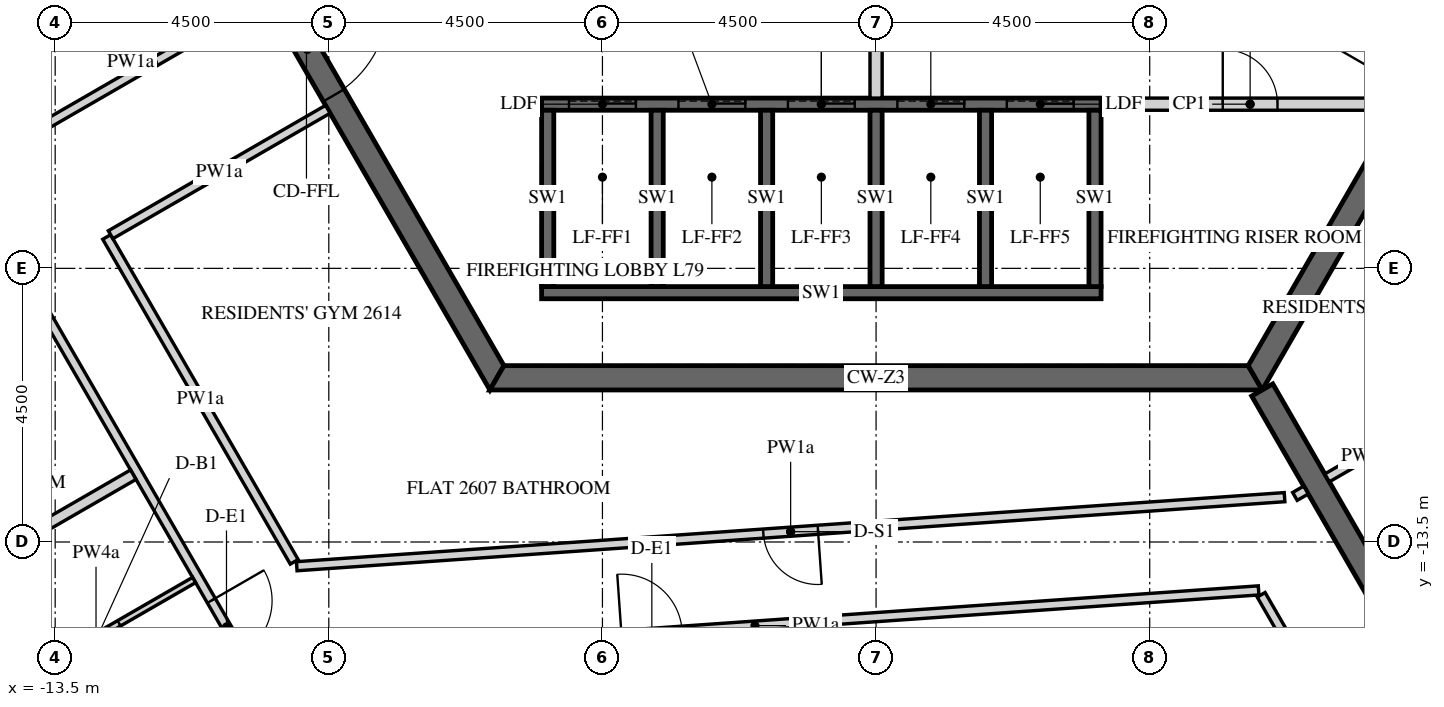
"""IFC4 building model, lengths in metres.
Left out: names, types, materials, properties, quantities, classifications, styles, units other than length and angle.
Written with IfcOpenShell. Run it as: python <this file> out.ifc"""

import sys

from ifc_helpers import new_model, si_unit, direction, frame, frame_2d, origin, place, context, subcontext, project, spatial, polyline, rectangle, outline, extrude, element, fill, save


model = new_model("IFC4")
c1 = context("Model", 3, precision=1e-05, world=origin(), true_north=direction((0.0, 1.0)))
c2 = subcontext(c1, "Body", "Model", "MODEL_VIEW")
j1 = project(units=[si_unit("LENGTHUNIT", "METRE"), si_unit("PLANEANGLEUNIT", "RADIAN")], contexts=[c1])
p1 = place(None, origin())
s1 = spatial("IfcSite", under=j1, at=p1, CompositionType="ELEMENT")
p2 = place(p1, origin())
s2 = spatial("IfcBuilding", under=s1, at=p2, CompositionType="ELEMENT")
p3 = place(p2, frame((0.0, 0.0, 326.4)))
s3 = spatial("IfcBuildingStorey", under=s2, at=p3, CompositionType="ELEMENT", Elevation=326.4)
p4 = place(p3, frame((-12.471, 0.0, -0.15), z_axis=(0.0, 0.0, 1.0), x_axis=(0.499996419489, -0.866027470984, 0.0)))
e1 = element("IfcWall", 1, at=p4, inside=s3, PredefinedType="SHEAR", context=c2, shape_type="SweptSolid", body=[
    extrude(outline(polyline([(-0.115, -0.2), (12.586, -0.2), (12.355, 0.2), (0.115, 0.2), (-0.115, -0.2)])), origin(), (0.0, 0.0, 1.0), 3.9),
])
p5 = place(p4, frame((5.306, 0.0, 0.15)))
e2 = element("IfcOpeningElement", 2, at=p5, cuts=e1, PredefinedType="OPENING", context=c2, shape_type="SweptSolid", body=[
    extrude(rectangle(XDim=1.8, YDim=2.4, at=frame_2d((0.9, 1.2))), frame((0.0, 0.21, 0.0), z_axis=(0.0, -1.0, 0.0), x_axis=(1.0, 0.0, 0.0)), (0.0, 0.0, 1.0), 0.42),
])
p6 = place(p3, frame((-6.235, -10.8, -0.15), z_axis=(0.0, 0.0, 1.0), x_axis=(1.0, 0.0, 0.0)))
e3 = element("IfcWall", 3, at=p6, inside=s3, PredefinedType="SHEAR", context=c2, shape_type="SweptSolid", body=[
    extrude(outline(polyline([(-0.115, -0.2), (12.586, -0.2), (12.355, 0.2), (0.115, 0.2), (-0.115, -0.2)])), origin(), (0.0, 0.0, 1.0), 3.9),
])
p7 = place(p3, frame((6.235, -10.8, -0.15), z_axis=(0.0, 0.0, 1.0), x_axis=(0.499996419489, 0.866027470984, 0.0)))
e4 = element("IfcWall", 4, at=p7, inside=s3, PredefinedType="SHEAR", context=c2, shape_type="SweptSolid", body=[
    extrude(outline(polyline([(-0.115, -0.2), (12.586, -0.2), (12.355, 0.2), (0.115, 0.2), (-0.115, -0.2)])), origin(), (0.0, 0.0, 1.0), 3.9),
])
p8 = place(p7, frame((5.364, 0.0, 0.15)))
e5 = element("IfcOpeningElement", 5, at=p8, cuts=e4, PredefinedType="OPENING", context=c2, shape_type="SweptSolid", body=[
    extrude(rectangle(XDim=1.8, YDim=2.4, at=frame_2d((0.9, 1.2))), frame((0.0, 0.21, 0.0), z_axis=(0.0, -1.0, 0.0), x_axis=(1.0, 0.0, 0.0)), (0.0, 0.0, 1.0), 0.42),
])
p9 = place(p3, frame((6.351, -11.0, -0.15), z_axis=(0.0, 0.0, 1.0), x_axis=(0.499998894578, -0.866026041999, 0.0)))
e6 = element("IfcWall", 6, at=p9, inside=s3, PredefinedType="SHEAR", context=c2, shape_type="SweptSolid", body=[
    extrude(rectangle(XDim=15.544, YDim=0.4, at=frame_2d((7.772, 0.0))), origin(), (0.0, 0.0, 1.0), 3.9),
])
p10 = place(p9, frame((6.872, 0.0, 0.15)))
e7 = element("IfcOpeningElement", 7, at=p10, cuts=e6, PredefinedType="OPENING", context=c2, shape_type="SweptSolid", body=[
    extrude(rectangle(XDim=1.8, YDim=2.4, at=frame_2d((0.9, 1.2))), frame((0.0, 0.21, 0.0), z_axis=(0.0, -1.0, 0.0), x_axis=(1.0, 0.0, 0.0)), (0.0, 0.0, 1.0), 0.42),
])
p11 = place(p3, frame((-5.5, -6.3, -0.25), z_axis=(0.0, 0.0, 1.0), x_axis=(1.0, 0.0, 0.0)))
e8 = element("IfcWall", 8, at=p11, inside=s3, PredefinedType="SHEAR", context=c2, shape_type="SweptSolid", body=[
    extrude(rectangle(XDim=9.2, YDim=0.2, at=frame_2d((4.6, 0.0))), origin(), (0.0, 0.0, 1.0), 3.9),
])
p12 = place(p11, frame((0.45, 0.0, 0.25)))
e9 = element("IfcOpeningElement", 9, at=p12, cuts=e8, PredefinedType="OPENING", context=c2, shape_type="SweptSolid", body=[
    extrude(rectangle(XDim=1.1, YDim=2.1, at=frame_2d((0.55, 1.05))), frame((0.0, 0.11, 0.0), z_axis=(0.0, -1.0, 0.0), x_axis=(1.0, 0.0, 0.0)), (0.0, 0.0, 1.0), 0.22),
])
p13 = place(p11, frame((2.25, 0.0, 0.25)))
e10 = element("IfcOpeningElement", 10, at=p13, cuts=e8, PredefinedType="OPENING", context=c2, shape_type="SweptSolid", body=[
    extrude(rectangle(XDim=1.1, YDim=2.1, at=frame_2d((0.55, 1.05))), frame((0.0, 0.11, 0.0), z_axis=(0.0, -1.0, 0.0), x_axis=(1.0, 0.0, 0.0)), (0.0, 0.0, 1.0), 0.22),
])
p14 = place(p11, frame((4.05, 0.0, 0.25)))
e11 = element("IfcOpeningElement", 11, at=p14, cuts=e8, PredefinedType="OPENING", context=c2, shape_type="SweptSolid", body=[
    extrude(rectangle(XDim=1.1, YDim=2.1, at=frame_2d((0.55, 1.05))), frame((0.0, 0.11, 0.0), z_axis=(0.0, -1.0, 0.0), x_axis=(1.0, 0.0, 0.0)), (0.0, 0.0, 1.0), 0.22),
])
p15 = place(p11, frame((5.85, 0.0, 0.25)))
e12 = element("IfcOpeningElement", 12, at=p15, cuts=e8, PredefinedType="OPENING", context=c2, shape_type="SweptSolid", body=[
    extrude(rectangle(XDim=1.1, YDim=2.1, at=frame_2d((0.55, 1.05))), frame((0.0, 0.11, 0.0), z_axis=(0.0, -1.0, 0.0), x_axis=(1.0, 0.0, 0.0)), (0.0, 0.0, 1.0), 0.22),
])
p16 = place(p11, frame((7.65, 0.0, 0.25)))
e13 = element("IfcOpeningElement", 13, at=p16, cuts=e8, PredefinedType="OPENING", context=c2, shape_type="SweptSolid", body=[
    extrude(rectangle(XDim=1.1, YDim=2.1, at=frame_2d((0.55, 1.05))), frame((0.0, 0.11, 0.0), z_axis=(0.0, -1.0, 0.0), x_axis=(1.0, 0.0, 0.0)), (0.0, 0.0, 1.0), 0.22),
])
p17 = place(p3, frame((-5.5, -9.4, -0.25), z_axis=(0.0, 0.0, 1.0), x_axis=(1.0, 0.0, 0.0)))
e14 = element("IfcWall", 14, at=p17, inside=s3, PredefinedType="SHEAR", context=c2, shape_type="SweptSolid", body=[
    extrude(rectangle(XDim=9.2, YDim=0.2, at=frame_2d((4.6, 0.0))), origin(), (0.0, 0.0, 1.0), 3.9),
])
for number, where, z_axis, x_axis in (
    (15, (-5.4, -9.3, -0.25), (0.0, 0.0, 1.0), (0.0, 1.0, 0.0)),
    (16, (-3.6, -9.3, -0.25), (0.0, 0.0, 1.0), (0.0, 1.0, 0.0)),
    (17, (-1.8, -9.3, -0.25), (0.0, 0.0, 1.0), (0.0, 1.0, 0.0)),
    (18, (0.0, -9.3, -0.25), (0.0, 0.0, 1.0), (0.0, 1.0, 0.0)),
    (19, (1.8, -9.3, -0.25), (0.0, 0.0, 1.0), (0.0, 1.0, 0.0)),
    (20, (3.6, -9.3, -0.25), (0.0, 0.0, 1.0), (0.0, 1.0, 0.0)),
):
    element("IfcWall", number, at=place(p3, frame(where, z_axis=z_axis, x_axis=x_axis)), inside=s3, PredefinedType="SHEAR", context=c2, shape_type="SweptSolid", body=[
        extrude(rectangle(XDim=2.9, YDim=0.2, at=frame_2d((1.45, 0.0))), origin(), (0.0, 0.0, 1.0), 3.9),
    ])
p18 = place(p3, frame((0.0, -6.2, 0.0), z_axis=(0.0, 0.0, 1.0), x_axis=(0.0, 1.0, 0.0)))
e21 = element("IfcWall", 21, at=p18, inside=s3, PredefinedType="PARTITIONING", context=c2, shape_type="SweptSolid", body=[
    extrude(rectangle(XDim=6.1, YDim=0.2, at=frame_2d((3.05, 0.0))), origin(), (0.0, 0.0, 1.0), 3.65),
])
p19 = place(p3, frame((3.7, -6.3, 0.0), z_axis=(0.0, 0.0, 1.0), x_axis=(1.0, 0.0, 0.0)))
e22 = element("IfcWall", 22, at=p19, inside=s3, PredefinedType="PARTITIONING", context=c2, shape_type="SweptSolid", body=[
    extrude(rectangle(XDim=4.903, YDim=0.2, at=frame_2d((2.451, 0.0))), origin(), (0.0, 0.0, 1.0), 3.65),
])
p20 = place(p19, frame((2.001, 0.0, 0.0)))
e23 = element("IfcOpeningElement", 23, at=p20, cuts=e22, PredefinedType="OPENING", context=c2, shape_type="SweptSolid", body=[
    extrude(rectangle(XDim=0.9, YDim=2.1, at=frame_2d((0.45, 1.05))), frame((0.0, 0.11, 0.0), z_axis=(0.0, -1.0, 0.0), x_axis=(1.0, 0.0, 0.0)), (0.0, 0.0, 1.0), 0.22),
])
p21 = place(p3, frame((-17.696, -2.749, 0.0), z_axis=(0.0, 0.0, 1.0), x_axis=(0.499997948852, -0.866026588012, 0.0)))
e24 = element("IfcWall", 24, at=p21, inside=s3, PredefinedType="PARTITIONING", context=c2, shape_type="SweptSolid", body=[
    extrude(rectangle(XDim=14.677, YDim=0.15, at=frame_2d((7.339, 0.0))), origin(), (0.0, 0.0, 1.0), 2.838),
])
p22 = place(p21, frame((0.4, 0.0, 0.0)))
e25 = element("IfcOpeningElement", 25, at=p22, cuts=e24, PredefinedType="OPENING", context=c2, shape_type="SweptSolid", body=[
    extrude(rectangle(XDim=1.0, YDim=2.1, at=frame_2d((0.5, 1.05))), frame((0.0, 0.085, 0.0), z_axis=(0.0, -1.0, 0.0), x_axis=(1.0, 0.0, 0.0)), (0.0, 0.0, 1.0), 0.17),
])
p23 = place(p21, frame((13.527, 0.0, 0.0)))
e26 = element("IfcOpeningElement", 26, at=p23, cuts=e24, PredefinedType="OPENING", context=c2, shape_type="SweptSolid", body=[
    extrude(rectangle(XDim=1.0, YDim=2.1, at=frame_2d((0.5, 1.05))), frame((0.0, 0.085, 0.0), z_axis=(0.0, -1.0, 0.0), x_axis=(1.0, 0.0, 0.0)), (0.0, 0.0, 1.0), 0.17),
])
p24 = place(p3, frame((-10.274, -15.454, 0.0), z_axis=(0.0, 0.0, 1.0), x_axis=(0.997563645223, 0.069762265797, 0.0)))
e27 = element("IfcWall", 27, at=p24, inside=s3, PredefinedType="PARTITIONING", context=c2, shape_type="SweptSolid", body=[
    extrude(rectangle(XDim=16.606, YDim=0.15, at=frame_2d((8.303, 0.0))), origin(), (0.0, 0.0, 1.0), 2.838),
])
p25 = place(p24, frame((6.103, 0.0, 0.0)))
e28 = element("IfcOpeningElement", 28, at=p25, cuts=e27, PredefinedType="OPENING", context=c2, shape_type="SweptSolid", body=[
    extrude(rectangle(XDim=1.0, YDim=2.1, at=frame_2d((0.5, 1.05))), frame((0.0, 0.085, 0.0), z_axis=(0.0, -1.0, 0.0), x_axis=(1.0, 0.0, 0.0)), (0.0, 0.0, 1.0), 0.17),
])
p26 = place(p3, frame((6.333, -14.368, 0.0), z_axis=(0.0, 0.0, 1.0), x_axis=(0.499977396983, -0.866038453249, 0.0)))
e29 = element("IfcWall", 29, at=p26, inside=s3, PredefinedType="PARTITIONING", context=c2, shape_type="SweptSolid", body=[
    extrude(rectangle(XDim=7.764, YDim=0.15, at=frame_2d((3.882, 0.0))), origin(), (0.0, 0.0, 1.0), 2.838),
])
p27 = place(p26, frame((4.364, 0.0, 0.0)))
e30 = element("IfcOpeningElement", 30, at=p27, cuts=e29, PredefinedType="OPENING", context=c2, shape_type="SweptSolid", body=[
    extrude(rectangle(XDim=1.0, YDim=2.1, at=frame_2d((0.5, 1.05))), frame((0.0, 0.085, 0.0), z_axis=(0.0, -1.0, 0.0), x_axis=(1.0, 0.0, 0.0)), (0.0, 0.0, 1.0), 0.17),
])
p28 = place(p3, frame((-10.066, -4.566, 0.0), z_axis=(0.0, 0.0, 1.0), x_axis=(-0.866023935413, -0.500002543286, 0.0)))
e31 = element("IfcWall", 31, at=p28, inside=s3, PredefinedType="PARTITIONING", context=c2, shape_type="SweptSolid", body=[
    extrude(rectangle(XDim=4.2, YDim=0.15, at=frame_2d((2.1, 0.0))), origin(), (0.0, 0.0, 1.0), 2.838),
])
p29 = place(p3, frame((7.07, -12.646, 0.0), z_axis=(0.0, 0.0, 1.0), x_axis=(-0.866378867349, -0.499387282788, 0.0)))
e32 = element("IfcWall", 32, at=p29, inside=s3, PredefinedType="PARTITIONING", context=c2, shape_type="SweptSolid", body=[
    extrude(rectangle(XDim=0.21, YDim=0.15, at=frame_2d((0.105, 0.0))), origin(), (0.0, 0.0, 1.0), 2.838),
])
p30 = place(p3, frame((6.717, -12.762, 0.0), z_axis=(0.0, 0.0, 1.0), x_axis=(-0.99756375843, -0.069760646978, 0.0)))
e33 = element("IfcWall", 33, at=p30, inside=s3, PredefinedType="PARTITIONING", context=c2, shape_type="SweptSolid", body=[
    extrude(rectangle(XDim=16.284, YDim=0.15, at=frame_2d((8.142, 0.0))), origin(), (0.0, 0.0, 1.0), 2.838),
])
p31 = place(p30, frame((7.692, 0.0, 0.0)))
e34 = element("IfcOpeningElement", 34, at=p31, cuts=e33, PredefinedType="OPENING", context=c2, shape_type="SweptSolid", body=[
    extrude(rectangle(XDim=0.9, YDim=2.1, at=frame_2d((0.45, 1.05))), frame((0.0, 0.085, 0.0), z_axis=(0.0, -1.0, 0.0), x_axis=(1.0, 0.0, 0.0)), (0.0, 0.0, 1.0), 0.17),
])
p32 = place(p3, frame((-9.569, -13.826, 0.0), z_axis=(0.0, 0.0, 1.0), x_axis=(-0.500017101833, 0.866015529811, 0.0)))
e35 = element("IfcWall", 35, at=p32, inside=s3, PredefinedType="PARTITIONING", context=c2, shape_type="SweptSolid", body=[
    extrude(rectangle(XDim=6.168, YDim=0.15, at=frame_2d((3.084, 0.0))), origin(), (0.0, 0.0, 1.0), 2.838),
])
p33 = place(p3, frame((-12.588, -8.447, 0.0), z_axis=(0.0, 0.0, 1.0), x_axis=(0.866034795751, 0.499983732284, 0.0)))
e36 = element("IfcWall", 36, at=p33, inside=s3, PredefinedType="PARTITIONING", context=c2, shape_type="SweptSolid", body=[
    extrude(rectangle(XDim=4.125, YDim=0.15, at=frame_2d((2.062, 0.0))), origin(), (0.0, 0.0, 1.0), 2.838),
])
p34 = place(p3, frame((8.65, -11.733, 0.0), z_axis=(0.0, 0.0, 1.0), x_axis=(-0.866062911188, -0.499935029643, 0.0)))
e37 = element("IfcWall", 37, at=p34, inside=s3, PredefinedType="PARTITIONING", context=c2, shape_type="SweptSolid", body=[
    extrude(rectangle(XDim=1.425, YDim=0.15, at=frame_2d((0.712, 0.0))), origin(), (0.0, 0.0, 1.0), 2.838),
])
p35 = place(p3, frame((-19.771, -16.755, 0.0), z_axis=(0.0, 0.0, 1.0), x_axis=(0.866025292695, 0.500000192413, 0.0)))
e38 = element("IfcWall", 38, at=p35, inside=s3, PredefinedType="PARTITIONING", context=c2, shape_type="SweptSolid", body=[
    extrude(rectangle(XDim=8.725, YDim=0.18, at=frame_2d((4.363, 0.0))), origin(), (0.0, 0.0, 1.0), 2.838),
])
p36 = place(p3, frame((-11.215, -14.125, 0.0), z_axis=(0.0, 0.0, 1.0), x_axis=(-0.866028424924, -0.499994767197, 0.0)))
e39 = element("IfcWall", 39, at=p36, inside=s3, PredefinedType="PARTITIONING", context=c2, shape_type="SweptSolid", body=[
    extrude(rectangle(XDim=3.725, YDim=0.1, at=frame_2d((1.863, 0.0))), origin(), (0.0, 0.0, 1.0), 2.838),
])
p37 = place(p36, frame((1.425, 0.0, 0.0)))
e40 = element("IfcOpeningElement", 40, at=p37, cuts=e39, PredefinedType="OPENING", context=c2, shape_type="SweptSolid", body=[
    extrude(rectangle(XDim=0.8, YDim=2.1, at=frame_2d((0.4, 1.05))), frame((0.0, 0.06, 0.0), z_axis=(0.0, -1.0, 0.0), x_axis=(1.0, 0.0, 0.0)), (0.0, 0.0, 1.0), 0.12),
])
p38 = place(p5, origin())
e41 = element("IfcDoor", 41, at=p38, inside=s3, OperationType="DOUBLE_DOOR_SINGLE_SWING", PredefinedType="DOOR", context=c2, shape_type="SweptSolid", body=[
    extrude(rectangle(XDim=1.8, YDim=2.4, at=frame_2d((0.9, 1.2))), frame((0.0, 0.025, 0.0), z_axis=(0.0, -1.0, 0.0), x_axis=(1.0, 0.0, 0.0)), (0.0, 0.0, 1.0), 0.05),
])
fill(e2, e41)
p39 = place(p20, origin())
e42 = element("IfcDoor", 42, at=p39, inside=s3, OperationType="SINGLE_SWING_LEFT", PredefinedType="DOOR", context=c2, shape_type="SweptSolid", body=[
    extrude(rectangle(XDim=0.9, YDim=2.1, at=frame_2d((0.45, 1.05))), frame((0.0, 0.025, 0.0), z_axis=(0.0, -1.0, 0.0), x_axis=(1.0, 0.0, 0.0)), (0.0, 0.0, 1.0), 0.05),
])
fill(e23, e42)
p40 = place(p12, origin())
e43 = element("IfcDoor", 43, at=p40, inside=s3, OperationType="SLIDING_TO_LEFT", PredefinedType="DOOR", context=c2, shape_type="SweptSolid", body=[
    extrude(rectangle(XDim=1.1, YDim=2.1, at=frame_2d((0.55, 1.05))), frame((0.0, 0.025, 0.0), z_axis=(0.0, -1.0, 0.0), x_axis=(1.0, 0.0, 0.0)), (0.0, 0.0, 1.0), 0.05),
])
fill(e9, e43)
p41 = place(p13, origin())
e44 = element("IfcDoor", 44, at=p41, inside=s3, OperationType="SLIDING_TO_LEFT", PredefinedType="DOOR", context=c2, shape_type="SweptSolid", body=[
    extrude(rectangle(XDim=1.1, YDim=2.1, at=frame_2d((0.55, 1.05))), frame((0.0, 0.025, 0.0), z_axis=(0.0, -1.0, 0.0), x_axis=(1.0, 0.0, 0.0)), (0.0, 0.0, 1.0), 0.05),
])
fill(e10, e44)
p42 = place(p14, origin())
e45 = element("IfcDoor", 45, at=p42, inside=s3, OperationType="SLIDING_TO_LEFT", PredefinedType="DOOR", context=c2, shape_type="SweptSolid", body=[
    extrude(rectangle(XDim=1.1, YDim=2.1, at=frame_2d((0.55, 1.05))), frame((0.0, 0.025, 0.0), z_axis=(0.0, -1.0, 0.0), x_axis=(1.0, 0.0, 0.0)), (0.0, 0.0, 1.0), 0.05),
])
fill(e11, e45)
p43 = place(p15, origin())
e46 = element("IfcDoor", 46, at=p43, inside=s3, OperationType="SLIDING_TO_LEFT", PredefinedType="DOOR", context=c2, shape_type="SweptSolid", body=[
    extrude(rectangle(XDim=1.1, YDim=2.1, at=frame_2d((0.55, 1.05))), frame((0.0, 0.025, 0.0), z_axis=(0.0, -1.0, 0.0), x_axis=(1.0, 0.0, 0.0)), (0.0, 0.0, 1.0), 0.05),
])
fill(e12, e46)
p44 = place(p16, origin())
e47 = element("IfcDoor", 47, at=p44, inside=s3, OperationType="SLIDING_TO_LEFT", PredefinedType="DOOR", context=c2, shape_type="SweptSolid", body=[
    extrude(rectangle(XDim=1.1, YDim=2.1, at=frame_2d((0.55, 1.05))), frame((0.0, 0.025, 0.0), z_axis=(0.0, -1.0, 0.0), x_axis=(1.0, 0.0, 0.0)), (0.0, 0.0, 1.0), 0.05),
])
fill(e13, e47)
p45 = place(p23, origin())
e48 = element("IfcDoor", 48, at=p45, inside=s3, OperationType="SINGLE_SWING_LEFT", PredefinedType="DOOR", context=c2, shape_type="SweptSolid", body=[
    extrude(rectangle(XDim=1.0, YDim=2.1, at=frame_2d((0.5, 1.05))), frame((0.0, 0.025, 0.0), z_axis=(0.0, -1.0, 0.0), x_axis=(1.0, 0.0, 0.0)), (0.0, 0.0, 1.0), 0.05),
])
fill(e26, e48)
p46 = place(p37, origin())
e49 = element("IfcDoor", 49, at=p46, inside=s3, OperationType="SINGLE_SWING_RIGHT", PredefinedType="DOOR", context=c2, shape_type="SweptSolid", body=[
    extrude(rectangle(XDim=0.8, YDim=2.1, at=frame_2d((0.4, 1.05))), frame((0.0, 0.025, 0.0), z_axis=(0.0, -1.0, 0.0), x_axis=(1.0, 0.0, 0.0)), (0.0, 0.0, 1.0), 0.05),
])
fill(e40, e49)
p47 = place(p31, origin())
e50 = element("IfcDoor", 50, at=p47, inside=s3, OperationType="SINGLE_SWING_RIGHT", PredefinedType="DOOR", context=c2, shape_type="SweptSolid", body=[
    extrude(rectangle(XDim=0.9, YDim=2.1, at=frame_2d((0.45, 1.05))), frame((0.0, 0.025, 0.0), z_axis=(0.0, -1.0, 0.0), x_axis=(1.0, 0.0, 0.0)), (0.0, 0.0, 1.0), 0.05),
])
fill(e34, e50)
save(model, sys.argv[1])
